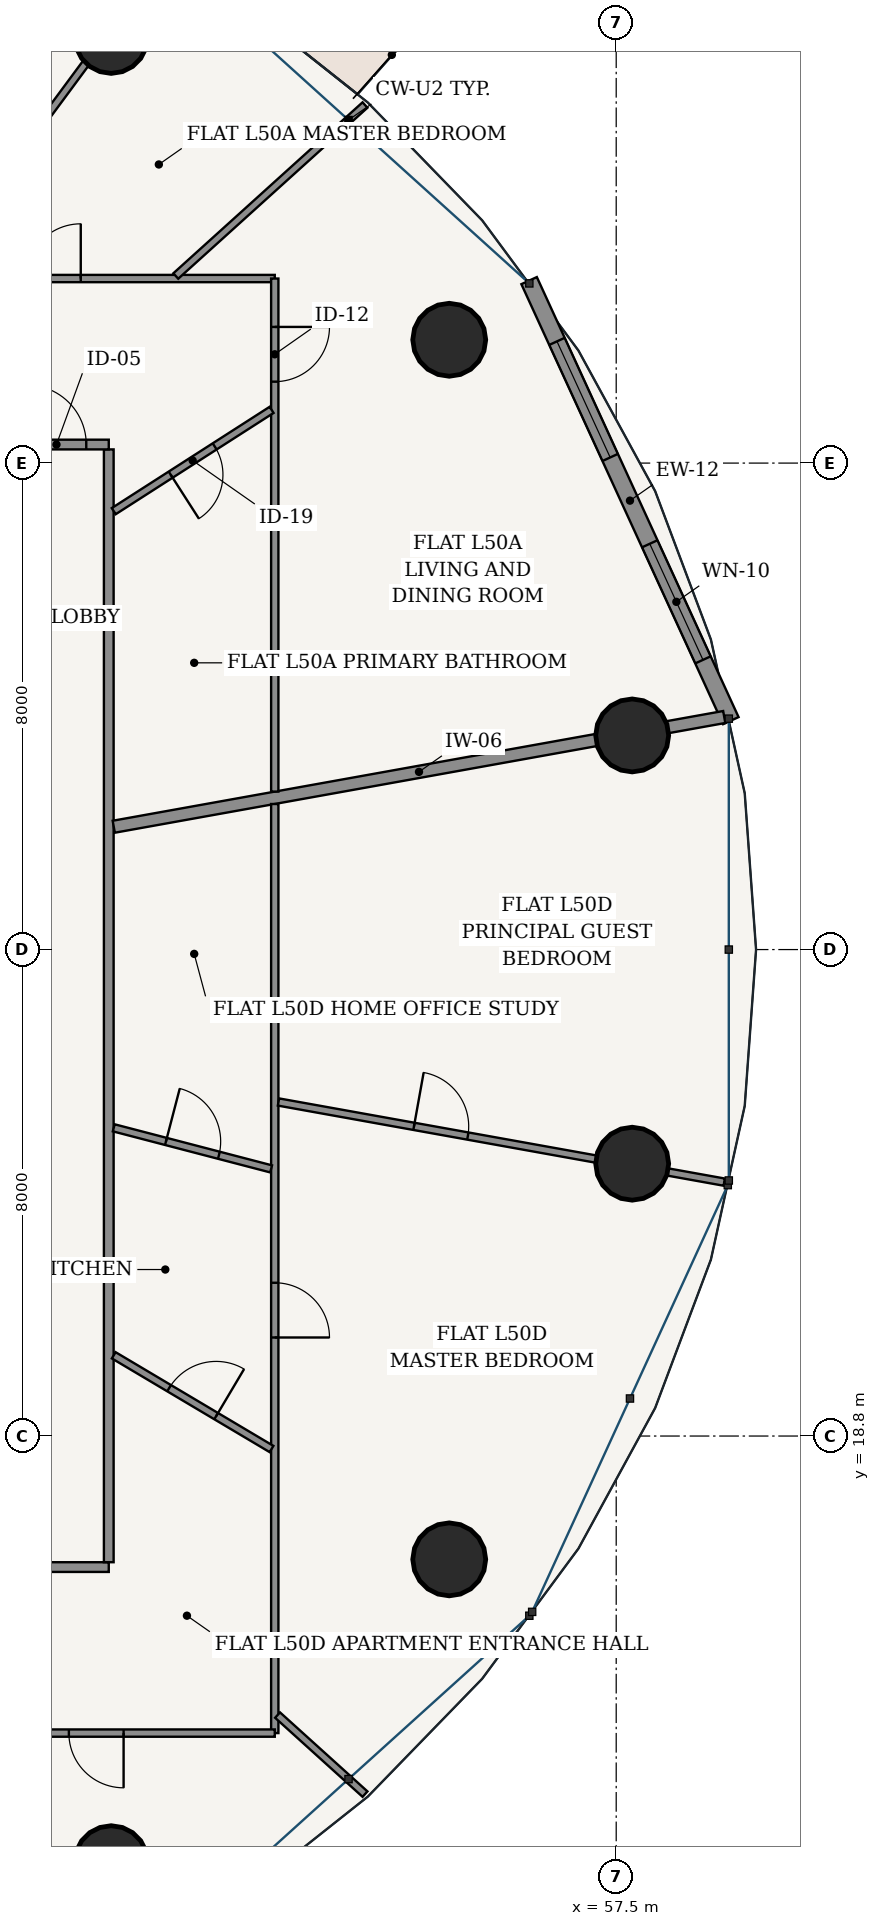
"""IFC4 building model, lengths in metres.
Left out: names, types, materials, properties, quantities, classifications, styles, units other than length and angle.
Written with IfcOpenShell. Run it as: python <this file> out.ifc"""

import sys

from ifc_helpers import new_model, si_unit, direction, frame, frame_2d, origin, origin_2d, place, context, subcontext, project, spatial, rectangle, hollow_circle, extrude, source, transform, mapped, element, fill, save


model = new_model("IFC4")
c1 = context("Model", 3, precision=1e-05, world=origin(), true_north=direction((-0.2419218956, 0.970295726276)))
c2 = subcontext(c1, "Body", "Model", "MODEL_VIEW")
j1 = project(units=[si_unit("LENGTHUNIT", "METRE"), si_unit("PLANEANGLEUNIT", "RADIAN")], contexts=[c1])
p1 = place(None, origin())
s1 = spatial("IfcSite", under=j1, at=p1, CompositionType="ELEMENT")
p2 = place(p1, origin())
s2 = spatial("IfcBuilding", under=s1, at=p2, CompositionType="ELEMENT")
p3 = place(p2, frame((0.0, 0.0, 191.2)))
s3 = spatial("IfcBuildingStorey", under=s2, at=p3, CompositionType="ELEMENT", Elevation=191.2)
for number, where, z_axis, x_axis in (
    (1, (57.763, 30.321, 0.0), (0.0, 0.0, 1.0), (1.0, 0.0, 0.0)),
    (2, (54.754, 36.828, 0.0), (0.0, 0.0, 1.0), (1.0, 0.0, 0.0)),
    (3, (49.195, 41.808, 0.0), (0.0, 0.0, 1.0), (1.0, 0.0, 0.0)),
    (4, (49.195, 11.792, 0.0), (0.0, 0.0, 1.0), (1.0, 0.0, 0.0)),
    (5, (54.754, 16.772, 0.0), (0.0, 0.0, 1.0), (1.0, 0.0, 0.0)),
    (6, (57.763, 23.279, 0.0), (0.0, 0.0, 1.0), (1.0, 0.0, 0.0)),
):
    element("IfcColumn", number, at=place(p3, frame(where, z_axis=z_axis, x_axis=x_axis)), inside=s3, PredefinedType="COLUMN", context=c2, shape_type="SweptSolid", body=[
        extrude(hollow_circle(Radius=0.6, WallThickness=0.038, at=origin_2d()), origin(), (0.0, 0.0, 1.0), 3.7),
    ])
p4 = place(p3, frame((59.385, 30.565, 0.0), z_axis=(0.0, 0.0, 1.0), x_axis=(-0.416717018135, 0.909036262641, 0.0)))
e7 = element("IfcWall", 7, at=p4, inside=s3, PredefinedType="SOLIDWALL", context=c2, shape_type="SweptSolid", body=[
    extrude(rectangle(XDim=7.96, YDim=0.28, at=frame_2d((3.98, 0.0))), origin(), (0.0, 0.0, 1.0), 3.435),
])
p5 = place(p4, frame((1.099, 0.0, 0.85)))
e8 = element("IfcOpeningElement", 8, at=p5, cuts=e7, PredefinedType="OPENING", context=c2, shape_type="SweptSolid", body=[
    extrude(rectangle(XDim=2.1, YDim=1.95, at=frame_2d((1.05, 0.975))), frame((0.0, 0.15, 0.0), z_axis=(0.0, -1.0, 0.0), x_axis=(1.0, 0.0, 0.0)), (0.0, 0.0, 1.0), 0.3),
])
p6 = place(p4, frame((4.761, 0.0, 0.85)))
e9 = element("IfcOpeningElement", 9, at=p6, cuts=e7, PredefinedType="OPENING", context=c2, shape_type="SweptSolid", body=[
    extrude(rectangle(XDim=2.1, YDim=1.95, at=frame_2d((1.05, 0.975))), frame((0.0, 0.15, 0.0), z_axis=(0.0, -1.0, 0.0), x_axis=(1.0, 0.0, 0.0)), (0.0, 0.0, 1.0), 0.3),
])
p7 = place(p3, frame((34.32, 16.645, 0.0), z_axis=(0.0, 0.0, 1.0), x_axis=(1.0, 0.0, 0.0)))
e10 = element("IfcWall", 10, at=p7, inside=s3, PredefinedType="PARTITIONING", context=c2, shape_type="SweptSolid", body=[
    extrude(rectangle(XDim=14.835, YDim=0.16, at=frame_2d((7.417, 0.0))), origin(), (0.0, 0.0, 1.0), 2.951),
])
p8 = place(p7, frame((11.961, 0.0, 0.0)))
e11 = element("IfcOpeningElement", 11, at=p8, cuts=e10, PredefinedType="OPENING", context=c2, shape_type="SweptSolid", body=[
    extrude(rectangle(XDim=0.98, YDim=2.2, at=frame_2d((0.49, 1.1))), frame((0.0, 0.09, 0.0), z_axis=(0.0, -1.0, 0.0), x_axis=(1.0, 0.0, 0.0)), (0.0, 0.0, 1.0), 0.18),
])
p9 = place(p3, frame((49.155, 16.725, 0.0), z_axis=(0.0, 0.0, 1.0), x_axis=(0.0, 1.0, 0.0)))
e12 = element("IfcWall", 12, at=p9, inside=s3, PredefinedType="PARTITIONING", context=c2, shape_type="SweptSolid", body=[
    extrude(rectangle(XDim=18.3, YDim=0.16, at=frame_2d((9.15, 0.0))), origin(), (0.0, 0.0, 1.0), 2.951),
])
p10 = place(p3, frame((47.225, 35.105, 0.0), z_axis=(0.0, 0.0, 1.0), x_axis=(1.0, 0.0, 0.0)))
e13 = element("IfcWall", 13, at=p10, inside=s3, PredefinedType="PARTITIONING", context=c2, shape_type="SweptSolid", body=[
    extrude(rectangle(XDim=1.93, YDim=0.16, at=frame_2d((0.965, 0.0))), origin(), (0.0, 0.0, 1.0), 3.435),
])
p11 = place(p10, frame((0.58, 0.0, 0.0)))
e14 = element("IfcOpeningElement", 14, at=p11, cuts=e13, PredefinedType="OPENING", context=c2, shape_type="SweptSolid", body=[
    extrude(rectangle(XDim=0.98, YDim=2.2, at=frame_2d((0.49, 1.1))), frame((0.0, 0.09, 0.0), z_axis=(0.0, -1.0, 0.0), x_axis=(1.0, 0.0, 0.0)), (0.0, 0.0, 1.0), 0.18),
])
p12 = place(p3, frame((49.237, 28.82, 0.0), z_axis=(0.0, 0.0, 1.0), x_axis=(0.984224859606, 0.176922089446, 0.0)))
e15 = element("IfcWall", 15, at=p12, inside=s3, PredefinedType="PARTITIONING", context=c2, shape_type="SweptSolid", body=[
    extrude(rectangle(XDim=10.2, YDim=0.2, at=frame_2d((5.1, 0.0))), origin(), (0.0, 0.0, 1.0), 2.951),
])
p13 = place(p3, frame((44.415, 37.835, 0.0), z_axis=(0.0, 0.0, 1.0), x_axis=(1.0, 0.0, 0.0)))
e16 = element("IfcWall", 16, at=p13, inside=s3, PredefinedType="PARTITIONING", context=c2, shape_type="SweptSolid", body=[
    extrude(rectangle(XDim=7.47, YDim=0.12, at=frame_2d((3.735, 0.0))), origin(), (0.0, 0.0, 1.0), 2.951),
])
p14 = place(p13, frame((3.379, 0.0, 0.0)))
e17 = element("IfcOpeningElement", 17, at=p14, cuts=e16, PredefinedType="OPENING", context=c2, shape_type="SweptSolid", body=[
    extrude(rectangle(XDim=0.9, YDim=2.15, at=frame_2d((0.45, 1.075))), frame((0.0, 0.07, 0.0), z_axis=(0.0, -1.0, 0.0), x_axis=(1.0, 0.0, 0.0)), (0.0, 0.0, 1.0), 0.14),
])
p15 = place(p3, frame((51.885, 37.835, 0.0), z_axis=(0.0, 0.0, 1.0), x_axis=(0.0, -1.0, 0.0)))
e18 = element("IfcWall", 18, at=p15, inside=s3, PredefinedType="PARTITIONING", context=c2, shape_type="SweptSolid", body=[
    extrude(rectangle(XDim=8.437, YDim=0.12, at=frame_2d((4.219, 0.0))), origin(), (0.0, 0.0, 1.0), 2.951),
])
p16 = place(p15, frame((0.796, 0.0, 0.0)))
e19 = element("IfcOpeningElement", 19, at=p16, cuts=e18, PredefinedType="OPENING", context=c2, shape_type="SweptSolid", body=[
    extrude(rectangle(XDim=0.9, YDim=2.15, at=frame_2d((0.45, 1.075))), frame((0.0, 0.07, 0.0), z_axis=(0.0, -1.0, 0.0), x_axis=(1.0, 0.0, 0.0)), (0.0, 0.0, 1.0), 0.14),
])
p17 = place(p3, frame((50.257, 37.876, 0.0), z_axis=(0.0, 0.0, 1.0), x_axis=(0.741943837234, 0.670462036502, 0.0)))
e20 = element("IfcWall", 20, at=p17, inside=s3, PredefinedType="PARTITIONING", context=c2, shape_type="SweptSolid", body=[
    extrude(rectangle(XDim=4.194, YDim=0.12, at=frame_2d((2.097, 0.0))), origin(), (0.0, 0.0, 1.0), 2.951),
])
p18 = place(p3, frame((46.196, 37.885, 0.0), z_axis=(0.0, 0.0, 1.0), x_axis=(0.594507557292, 0.804090022524, 0.0)))
e21 = element("IfcWall", 21, at=p18, inside=s3, PredefinedType="PARTITIONING", context=c2, shape_type="SweptSolid", body=[
    extrude(rectangle(XDim=6.481, YDim=0.12, at=frame_2d((3.241, 0.0))), origin(), (0.0, 0.0, 1.0), 2.951),
])
p19 = place(p3, frame((49.237, 34.009, 0.0), z_axis=(0.0, 0.0, 1.0), x_axis=(0.841651322174, 0.540021343915, 0.0)))
e22 = element("IfcWall", 22, at=p19, inside=s3, PredefinedType="PARTITIONING", context=c2, shape_type="SweptSolid", body=[
    extrude(rectangle(XDim=3.085, YDim=0.12, at=frame_2d((1.542, 0.0))), origin(), (0.0, 0.0, 1.0), 3.11),
])
p20 = place(p19, frame((1.112, 0.0, 0.0)))
e23 = element("IfcOpeningElement", 23, at=p20, cuts=e22, PredefinedType="OPENING", context=c2, shape_type="SweptSolid", body=[
    extrude(rectangle(XDim=0.86, YDim=2.15, at=frame_2d((0.43, 1.075))), frame((0.0, 0.07, 0.0), z_axis=(0.0, -1.0, 0.0), x_axis=(1.0, 0.0, 0.0)), (0.0, 0.0, 1.0), 0.14),
])
p21 = place(p3, frame((51.885, 29.194, 0.0), z_axis=(0.0, 0.0, 1.0), x_axis=(0.0, -1.0, 0.0)))
e24 = element("IfcWall", 24, at=p21, inside=s3, PredefinedType="PARTITIONING", context=c2, shape_type="SweptSolid", body=[
    extrude(rectangle(XDim=15.279, YDim=0.12, at=frame_2d((7.639, 0.0))), origin(), (0.0, 0.0, 1.0), 2.951),
])
p22 = place(p21, frame((7.873, 0.0, 0.0)))
e25 = element("IfcOpeningElement", 25, at=p22, cuts=e24, PredefinedType="OPENING", context=c2, shape_type="SweptSolid", body=[
    extrude(rectangle(XDim=0.9, YDim=2.15, at=frame_2d((0.45, 1.075))), frame((0.0, 0.07, 0.0), z_axis=(0.0, -1.0, 0.0), x_axis=(1.0, 0.0, 0.0)), (0.0, 0.0, 1.0), 0.14),
])
p23 = place(p3, frame((51.885, 13.915, 0.0), z_axis=(0.0, 0.0, 1.0), x_axis=(-1.0, 0.0, 0.0)))
e26 = element("IfcWall", 26, at=p23, inside=s3, PredefinedType="PARTITIONING", context=c2, shape_type="SweptSolid", body=[
    extrude(rectangle(XDim=10.947, YDim=0.12, at=frame_2d((5.473, 0.0))), origin(), (0.0, 0.0, 1.0), 2.951),
])
p24 = place(p23, frame((2.486, 0.0, 0.0)))
e27 = element("IfcOpeningElement", 27, at=p24, cuts=e26, PredefinedType="OPENING", context=c2, shape_type="SweptSolid", body=[
    extrude(rectangle(XDim=0.9, YDim=2.15, at=frame_2d((0.45, 1.075))), frame((0.0, 0.07, 0.0), z_axis=(0.0, -1.0, 0.0), x_axis=(1.0, 0.0, 0.0)), (0.0, 0.0, 1.0), 0.14),
])
p25 = place(p3, frame((51.931, 14.211, 0.0), z_axis=(0.0, 0.0, 1.0), x_axis=(0.741971265209, -0.670431683026, 0.0)))
e28 = element("IfcWall", 28, at=p25, inside=s3, PredefinedType="PARTITIONING", context=c2, shape_type="SweptSolid", body=[
    extrude(rectangle(XDim=1.938, YDim=0.12, at=frame_2d((0.969, 0.0))), origin(), (0.0, 0.0, 1.0), 2.951),
])
p26 = place(p3, frame((51.946, 24.293, 0.0), z_axis=(0.0, 0.0, 1.0), x_axis=(0.984227185588, -0.176909149424, 0.0)))
e29 = element("IfcWall", 29, at=p26, inside=s3, PredefinedType="PARTITIONING", context=c2, shape_type="SweptSolid", body=[
    extrude(rectangle(XDim=7.448, YDim=0.12, at=frame_2d((3.724, 0.0))), origin(), (0.0, 0.0, 1.0), 2.951),
])
p27 = place(p26, frame((2.264, 0.0, 0.0)))
e30 = element("IfcOpeningElement", 30, at=p27, cuts=e29, PredefinedType="OPENING", context=c2, shape_type="SweptSolid", body=[
    extrude(rectangle(XDim=0.9, YDim=2.15, at=frame_2d((0.45, 1.075))), frame((0.0, 0.07, 0.0), z_axis=(0.0, -1.0, 0.0), x_axis=(1.0, 0.0, 0.0)), (0.0, 0.0, 1.0), 0.14),
])
p28 = place(p3, frame((49.237, 20.128, 0.0), z_axis=(0.0, 0.0, 1.0), x_axis=(0.859818120481, -0.510600430565, 0.0)))
e31 = element("IfcWall", 31, at=p28, inside=s3, PredefinedType="PARTITIONING", context=c2, shape_type="SweptSolid", body=[
    extrude(rectangle(XDim=3.018, YDim=0.12, at=frame_2d((1.509, 0.0))), origin(), (0.0, 0.0, 1.0), 2.951),
])
p29 = place(p28, frame((1.059, 0.0, 0.0)))
e32 = element("IfcOpeningElement", 32, at=p29, cuts=e31, PredefinedType="OPENING", context=c2, shape_type="SweptSolid", body=[
    extrude(rectangle(XDim=0.9, YDim=2.15, at=frame_2d((0.45, 1.075))), frame((0.0, 0.07, 0.0), z_axis=(0.0, -1.0, 0.0), x_axis=(1.0, 0.0, 0.0)), (0.0, 0.0, 1.0), 0.14),
])
p30 = place(p3, frame((49.237, 23.868, 0.0), z_axis=(0.0, 0.0, 1.0), x_axis=(0.967622119215, -0.252403316946, 0.0)))
e33 = element("IfcWall", 33, at=p30, inside=s3, PredefinedType="PARTITIONING", context=c2, shape_type="SweptSolid", body=[
    extrude(rectangle(XDim=2.675, YDim=0.12, at=frame_2d((1.337, 0.0))), origin(), (0.0, 0.0, 1.0), 3.435),
])
p31 = place(p30, frame((0.887, 0.0, 0.0)))
e34 = element("IfcOpeningElement", 34, at=p31, cuts=e33, PredefinedType="OPENING", context=c2, shape_type="SweptSolid", body=[
    extrude(rectangle(XDim=0.9, YDim=2.15, at=frame_2d((0.45, 1.075))), frame((0.0, 0.07, 0.0), z_axis=(0.0, -1.0, 0.0), x_axis=(1.0, 0.0, 0.0)), (0.0, 0.0, 1.0), 0.14),
])
m1 = source(origin(), c2, "Body", "SweptSolid", [
    extrude(rectangle(XDim=2.1, YDim=1.95, at=frame_2d((1.05, 0.975))), frame((0.0, 0.03, 0.0), z_axis=(0.0, -1.0, 0.0), x_axis=(1.0, 0.0, 0.0)), (0.0, 0.0, 1.0), 0.06),
])
p32 = place(p5, origin())
e35 = element("IfcWindow", 35, at=p32, inside=s3, PartitioningType="SINGLE_PANEL", PredefinedType="WINDOW", context=c2, shape_type="MappedRepresentation", body=[
    mapped(m1, transform((0.0, 0.0, 0.0), scale=1.0)),
])
fill(e8, e35)
p33 = place(p6, origin())
e36 = element("IfcWindow", 36, at=p33, inside=s3, PartitioningType="SINGLE_PANEL", PredefinedType="WINDOW", context=c2, shape_type="MappedRepresentation", body=[
    mapped(m1, transform((0.0, 0.0, 0.0), scale=1.0)),
])
fill(e9, e36)
m2 = source(origin(), c2, "Body", "SweptSolid", [
    extrude(rectangle(XDim=0.98, YDim=2.2, at=frame_2d((0.49, 1.1))), frame((0.0, 0.025, 0.0), z_axis=(0.0, -1.0, 0.0), x_axis=(1.0, 0.0, 0.0)), (0.0, 0.0, 1.0), 0.05),
])
p34 = place(p11, origin())
e37 = element("IfcDoor", 37, at=p34, inside=s3, OperationType="SINGLE_SWING_LEFT", PredefinedType="DOOR", context=c2, shape_type="MappedRepresentation", body=[
    mapped(m2, transform((0.0, 0.0, 0.0), scale=1.0)),
])
fill(e14, e37)
m3 = source(origin(), c2, "Body", "SweptSolid", [
    extrude(rectangle(XDim=0.86, YDim=2.15, at=frame_2d((0.43, 1.075))), frame((0.0, 0.025, 0.0), z_axis=(0.0, -1.0, 0.0), x_axis=(1.0, 0.0, 0.0)), (0.0, 0.0, 1.0), 0.05),
])
p35 = place(p20, frame((0.86, 0.0, 0.0), z_axis=(0.0, 0.0, 1.0), x_axis=(-1.0, 0.0, 0.0)))
e38 = element("IfcDoor", 38, at=p35, inside=s3, OperationType="SINGLE_SWING_RIGHT", PredefinedType="DOOR", context=c2, shape_type="MappedRepresentation", body=[
    mapped(m3, transform((0.0, 0.0, 0.0), scale=1.0)),
])
fill(e23, e38)
m4 = source(origin(), c2, "Body", "SweptSolid", [
    extrude(rectangle(XDim=0.9, YDim=2.15, at=frame_2d((0.45, 1.075))), frame((0.0, 0.025, 0.0), z_axis=(0.0, -1.0, 0.0), x_axis=(1.0, 0.0, 0.0)), (0.0, 0.0, 1.0), 0.05),
])
p36 = place(p16, origin())
e39 = element("IfcDoor", 39, at=p36, inside=s3, OperationType="SINGLE_SWING_LEFT", PredefinedType="DOOR", context=c2, shape_type="MappedRepresentation", body=[
    mapped(m4, transform((0.0, 0.0, 0.0), scale=1.0)),
])
fill(e19, e39)
p37 = place(p14, origin())
e40 = element("IfcDoor", 40, at=p37, inside=s3, OperationType="SINGLE_SWING_RIGHT", PredefinedType="DOOR", context=c2, shape_type="MappedRepresentation", body=[
    mapped(m4, transform((0.0, 0.0, 0.0), scale=1.0)),
])
fill(e17, e40)
p38 = place(p24, origin())
e41 = element("IfcDoor", 41, at=p38, inside=s3, OperationType="SINGLE_SWING_LEFT", PredefinedType="DOOR", context=c2, shape_type="MappedRepresentation", body=[
    mapped(m4, transform((0.0, 0.0, 0.0), scale=1.0)),
])
fill(e27, e41)
p39 = place(p29, origin())
e42 = element("IfcDoor", 42, at=p39, inside=s3, OperationType="SINGLE_SWING_RIGHT", PredefinedType="DOOR", context=c2, shape_type="MappedRepresentation", body=[
    mapped(m4, transform((0.0, 0.0, 0.0), scale=1.0)),
])
fill(e32, e42)
p40 = place(p31, origin())
e43 = element("IfcDoor", 43, at=p40, inside=s3, OperationType="SINGLE_SWING_LEFT", PredefinedType="DOOR", context=c2, shape_type="MappedRepresentation", body=[
    mapped(m4, transform((0.0, 0.0, 0.0), scale=1.0)),
])
fill(e34, e43)
p41 = place(p22, origin())
e44 = element("IfcDoor", 44, at=p41, inside=s3, OperationType="SINGLE_SWING_RIGHT", PredefinedType="DOOR", context=c2, shape_type="MappedRepresentation", body=[
    mapped(m4, transform((0.0, 0.0, 0.0), scale=1.0)),
])
fill(e25, e44)
p42 = place(p27, origin())
e45 = element("IfcDoor", 45, at=p42, inside=s3, OperationType="SINGLE_SWING_LEFT", PredefinedType="DOOR", context=c2, shape_type="MappedRepresentation", body=[
    mapped(m4, transform((0.0, 0.0, 0.0), scale=1.0)),
])
fill(e30, e45)
save(model, sys.argv[1])
